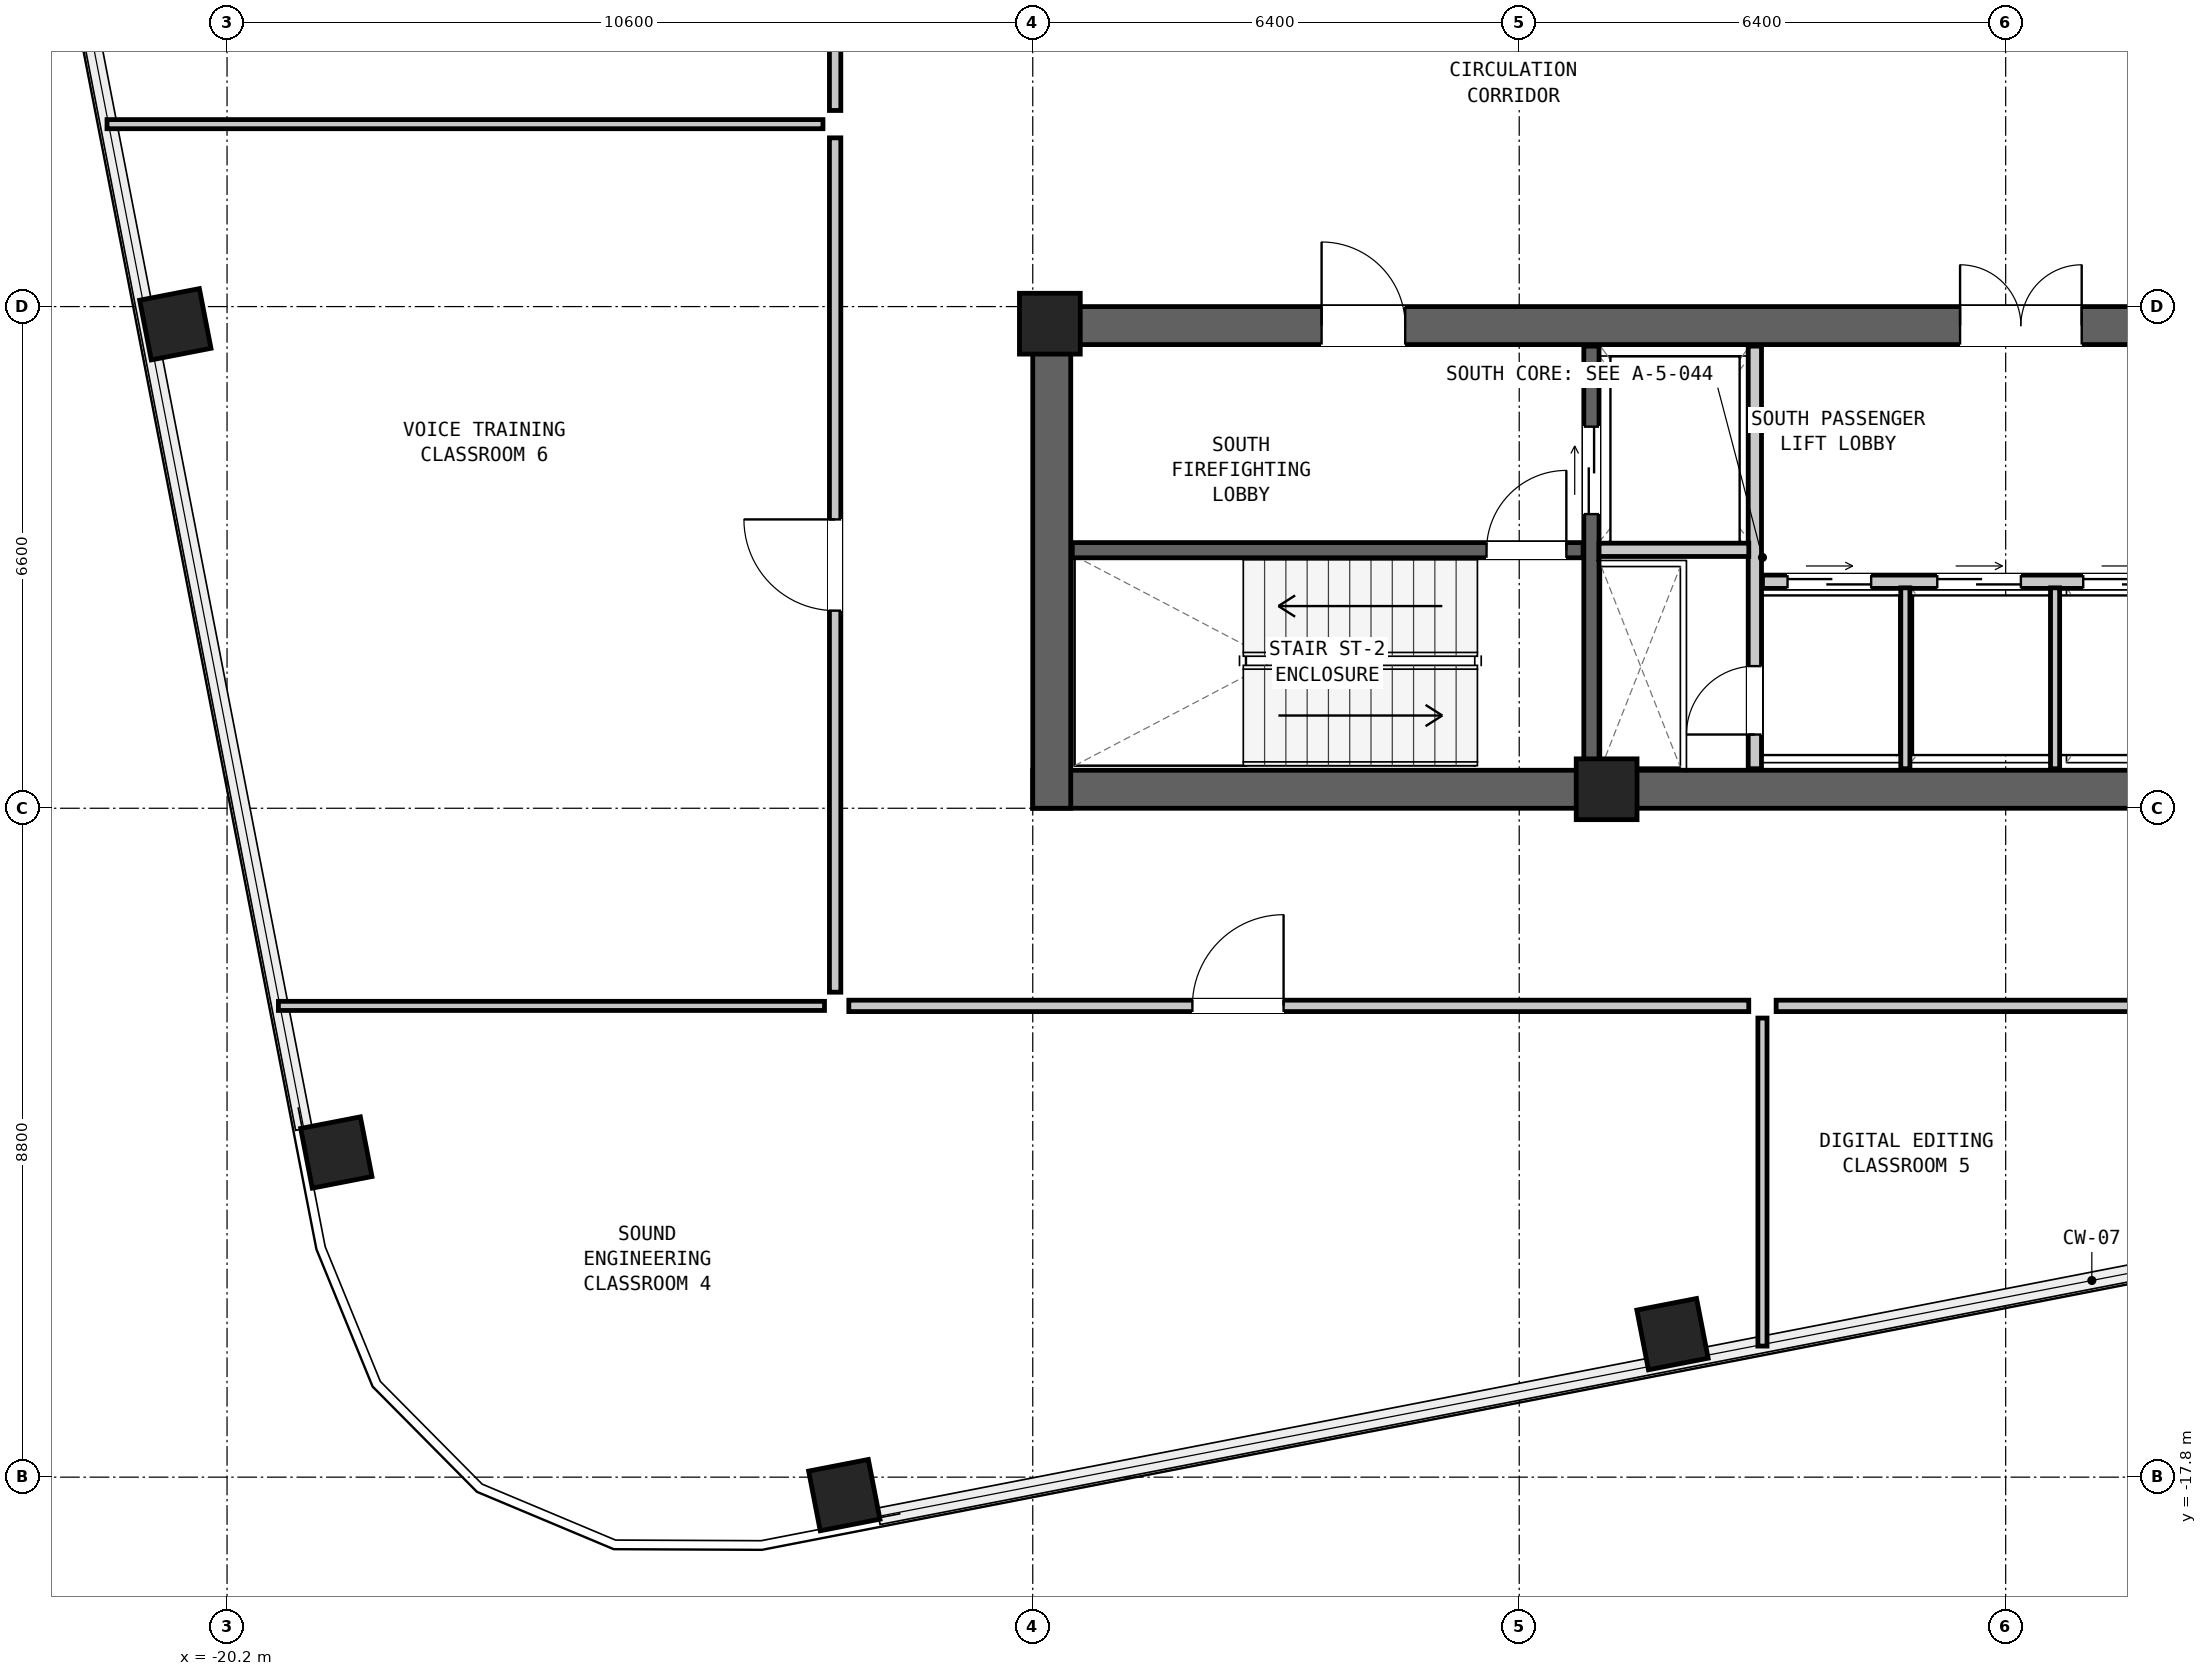
"""IFC4 building model, lengths in metres.
Left out: names, types, materials, properties, quantities, classifications, styles, units other than length and angle.
Written with IfcOpenShell. Run it as: python <this file> out.ifc"""

import sys

from ifc_helpers import new_model, si_unit, direction, frame, frame_2d, origin, origin_2d, place, context, subcontext, project, spatial, rectangle, hollow_rectangle, extrude, element, fill, save


model = new_model("IFC4")
c1 = context("Model", 3, precision=1e-05, world=origin(), true_north=direction((0.0, 1.0)))
c2 = subcontext(c1, "Body", "Model", "MODEL_VIEW")
j1 = project(units=[si_unit("LENGTHUNIT", "METRE"), si_unit("PLANEANGLEUNIT", "RADIAN")], contexts=[c1])
p1 = place(None, origin())
s1 = spatial("IfcSite", under=j1, at=p1, CompositionType="ELEMENT")
p2 = place(p1, origin())
s2 = spatial("IfcBuilding", under=s1, at=p2, CompositionType="ELEMENT")
p3 = place(p2, frame((0.0, 0.0, 140.25)))
s3 = spatial("IfcBuildingStorey", under=s2, at=p3, CompositionType="ELEMENT", Elevation=140.25)
p4 = place(p3, frame((-9.6, -8.75, 0.0), z_axis=(0.0, 0.0, 1.0), x_axis=(1.0, 0.0, 0.0)))
e1 = element("IfcWall", 1, at=p4, inside=s3, PredefinedType="SHEAR", context=c2, shape_type="SweptSolid", body=[
    extrude(rectangle(XDim=19.2, YDim=0.5, at=frame_2d((9.6, 0.0))), origin(), (0.0, 0.0, 1.0), 4.35),
])
p5 = place(p3, frame((-9.6, -2.65, 0.0), z_axis=(0.0, 0.0, 1.0), x_axis=(1.0, 0.0, 0.0)))
e2 = element("IfcWall", 2, at=p5, inside=s3, PredefinedType="SHEAR", context=c2, shape_type="SweptSolid", body=[
    extrude(rectangle(XDim=19.2, YDim=0.5, at=frame_2d((9.6, 0.0))), origin(), (0.0, 0.0, 1.0), 4.35),
])
p6 = place(p5, frame((3.8, 0.0, 0.0)))
e3 = element("IfcOpeningElement", 3, at=p6, cuts=e2, PredefinedType="OPENING", context=c2, shape_type="SweptSolid", body=[
    extrude(rectangle(XDim=1.1, YDim=2.08, at=frame_2d((0.55, 1.04))), frame((0.0, 0.262, 0.0), z_axis=(0.0, -1.0, 0.0), x_axis=(1.0, 0.0, 0.0)), (0.0, 0.0, 1.0), 0.524),
])
p7 = place(p5, frame((12.2, 0.0, 0.0)))
e4 = element("IfcOpeningElement", 4, at=p7, cuts=e2, PredefinedType="OPENING", context=c2, shape_type="SweptSolid", body=[
    extrude(rectangle(XDim=1.6, YDim=2.12, at=frame_2d((0.8, 1.06))), frame((0.0, 0.262, 0.0), z_axis=(0.0, -1.0, 0.0), x_axis=(1.0, 0.0, 0.0)), (0.0, 0.0, 1.0), 0.524),
])
p8 = place(p5, frame((16.5, 0.0, 0.0)))
e5 = element("IfcOpeningElement", 5, at=p8, cuts=e2, PredefinedType="OPENING", context=c2, shape_type="SweptSolid", body=[
    extrude(rectangle(XDim=0.9, YDim=2.05, at=frame_2d((0.45, 1.025))), frame((0.0, 0.262, 0.0), z_axis=(0.0, -1.0, 0.0), x_axis=(1.0, 0.0, 0.0)), (0.0, 0.0, 1.0), 0.524),
])
p9 = place(p3, frame((-9.35, -9.0, 0.0), z_axis=(0.0, 0.0, 1.0), x_axis=(0.0, 1.0, 0.0)))
e6 = element("IfcWall", 6, at=p9, inside=s3, PredefinedType="SHEAR", context=c2, shape_type="SweptSolid", body=[
    extrude(rectangle(XDim=6.6, YDim=0.5, at=frame_2d((3.3, 0.0))), origin(), (0.0, 0.0, 1.0), 4.35),
])
for number, where, z_axis, x_axis in (
    (7, (-12.08, -18.036, 0.0), (0.0, 0.0, 1.0), (0.982, 0.191, 0.0)),
    (8, (-1.183, -15.918, 0.0), (0.0, 0.0, 1.0), (0.982, 0.191, 0.0)),
    (9, (-20.88, -2.633, 0.0), (0.0, 0.0, 1.0), (-0.191, 0.982, 0.0)),
    (10, (-18.762, -13.529, 0.0), (0.0, 0.0, 1.0), (-0.191, 0.982, 0.0)),
):
    element("IfcColumn", number, at=place(p3, frame(where, z_axis=z_axis, x_axis=x_axis)), inside=s3, PredefinedType="COLUMN", context=c2, shape_type="SweptSolid", body=[
        extrude(hollow_rectangle(XDim=0.8, YDim=0.8, WallThickness=0.05, at=origin_2d()), origin(), (0.0, 0.0, 1.0), 4.35),
    ])
for number, where, z_axis, x_axis in (
    (11, (-9.375, -2.625, 0.0), (0.0, 0.0, 1.0), (1.0, 0.0, 0.0)),
    (12, (-2.05, -8.75, 0.0), (0.0, 0.0, 1.0), (1.0, 0.0, 0.0)),
):
    element("IfcColumn", number, at=place(p3, frame(where, z_axis=z_axis, x_axis=x_axis)), inside=s3, PredefinedType="COLUMN", context=c2, shape_type="SweptSolid", body=[
        extrude(rectangle(XDim=0.8, YDim=0.8, at=origin_2d()), origin(), (0.0, 0.0, 1.0), 4.35),
    ])
p10 = place(p3, frame((-9.08, -5.605, 0.0), z_axis=(0.0, 0.0, 1.0), x_axis=(1.0, 0.0, 0.0)))
e13 = element("IfcWall", 13, at=p10, inside=s3, PredefinedType="SHEAR", context=c2, shape_type="SweptSolid", body=[
    extrude(rectangle(XDim=6.72, YDim=0.2, at=frame_2d((3.36, 0.0))), origin(), (0.0, 0.0, 1.0), 4.07),
])
p11 = place(p10, frame((5.45, 0.0, 0.0)))
e14 = element("IfcOpeningElement", 14, at=p11, cuts=e13, PredefinedType="OPENING", context=c2, shape_type="SweptSolid", body=[
    extrude(rectangle(XDim=1.05, YDim=2.08, at=frame_2d((0.525, 1.04))), frame((0.0, 0.112, 0.0), z_axis=(0.0, -1.0, 0.0), x_axis=(1.0, 0.0, 0.0)), (0.0, 0.0, 1.0), 0.224),
])
p12 = place(p3, frame((-2.25, -8.48, 0.0), z_axis=(0.0, 0.0, 1.0), x_axis=(0.0, 1.0, 0.0)))
e15 = element("IfcWall", 15, at=p12, inside=s3, PredefinedType="SHEAR", context=c2, shape_type="SweptSolid", body=[
    extrude(rectangle(XDim=5.56, YDim=0.2, at=frame_2d((2.78, 0.0))), origin(), (0.0, 0.0, 1.0), 4.07),
])
p13 = place(p12, frame((3.35, 0.0, 0.0)))
e16 = element("IfcOpeningElement", 16, at=p13, cuts=e15, PredefinedType="OPENING", context=c2, shape_type="SweptSolid", body=[
    extrude(rectangle(XDim=1.15, YDim=2.08, at=frame_2d((0.575, 1.04))), frame((0.0, 0.112, 0.0), z_axis=(0.0, -1.0, 0.0), x_axis=(1.0, 0.0, 0.0)), (0.0, 0.0, 1.0), 0.224),
])
p14 = place(p3, frame((-0.1, -8.48, 0.0), z_axis=(0.0, 0.0, 1.0), x_axis=(0.0, 1.0, 0.0)))
e17 = element("IfcWall", 17, at=p14, inside=s3, PredefinedType="PARTITIONING", context=c2, shape_type="SweptSolid", body=[
    extrude(rectangle(XDim=5.56, YDim=0.175, at=frame_2d((2.78, 0.0))), origin(), (0.0, 0.0, 1.0), 4.07),
])
p15 = place(p14, frame((0.45, 0.0, 0.0)))
e18 = element("IfcOpeningElement", 18, at=p15, cuts=e17, PredefinedType="OPENING", context=c2, shape_type="SweptSolid", body=[
    extrude(rectangle(XDim=0.9, YDim=2.05, at=frame_2d((0.45, 1.025))), frame((0.0, 0.1, 0.0), z_axis=(0.0, -1.0, 0.0), x_axis=(1.0, 0.0, 0.0)), (0.0, 0.0, 1.0), 0.199),
])
p16 = place(p3, frame((-2.15, -5.6, 0.0), z_axis=(0.0, 0.0, 1.0), x_axis=(1.0, 0.0, 0.0)))
e19 = element("IfcWall", 19, at=p16, inside=s3, PredefinedType="PARTITIONING", context=c2, shape_type="SweptSolid", body=[
    extrude(rectangle(XDim=1.97, YDim=0.175, at=frame_2d((0.985, 0.0))), origin(), (0.0, 0.0, 1.0), 4.07),
])
p17 = place(p3, frame((0.0, -6.02, 0.0), z_axis=(0.0, 0.0, 1.0), x_axis=(1.0, 0.0, 0.0)))
e20 = element("IfcWall", 20, at=p17, inside=s3, PredefinedType="PARTITIONING", context=c2, shape_type="SweptSolid", body=[
    extrude(rectangle(XDim=9.08, YDim=0.175, at=frame_2d((4.54, 0.0))), origin(), (0.0, 0.0, 1.0), 4.07),
])
p18 = place(p17, frame((0.33, 0.0, 0.0)))
e21 = element("IfcOpeningElement", 21, at=p18, cuts=e20, PredefinedType="OPENING", context=c2, shape_type="SweptSolid", body=[
    extrude(rectangle(XDim=1.1, YDim=2.06, at=frame_2d((0.55, 1.03))), frame((0.0, 0.1, 0.0), z_axis=(0.0, -1.0, 0.0), x_axis=(1.0, 0.0, 0.0)), (0.0, 0.0, 1.0), 0.199),
])
p19 = place(p17, frame((2.3, 0.0, 0.0)))
e22 = element("IfcOpeningElement", 22, at=p19, cuts=e20, PredefinedType="OPENING", context=c2, shape_type="SweptSolid", body=[
    extrude(rectangle(XDim=1.1, YDim=2.06, at=frame_2d((0.55, 1.03))), frame((0.0, 0.1, 0.0), z_axis=(0.0, -1.0, 0.0), x_axis=(1.0, 0.0, 0.0)), (0.0, 0.0, 1.0), 0.199),
])
p20 = place(p17, frame((4.22, 0.0, 0.0)))
e23 = element("IfcOpeningElement", 23, at=p20, cuts=e20, PredefinedType="OPENING", context=c2, shape_type="SweptSolid", body=[
    extrude(rectangle(XDim=1.1, YDim=2.06, at=frame_2d((0.55, 1.03))), frame((0.0, 0.1, 0.0), z_axis=(0.0, -1.0, 0.0), x_axis=(1.0, 0.0, 0.0)), (0.0, 0.0, 1.0), 0.199),
])
p21 = place(p17, frame((5.94, 0.0, 0.0)))
e24 = element("IfcOpeningElement", 24, at=p21, cuts=e20, PredefinedType="OPENING", context=c2, shape_type="SweptSolid", body=[
    extrude(rectangle(XDim=1.1, YDim=2.06, at=frame_2d((0.55, 1.03))), frame((0.0, 0.1, 0.0), z_axis=(0.0, -1.0, 0.0), x_axis=(1.0, 0.0, 0.0)), (0.0, 0.0, 1.0), 0.199),
])
p22 = place(p17, frame((7.66, 0.0, 0.0)))
e25 = element("IfcOpeningElement", 25, at=p22, cuts=e20, PredefinedType="OPENING", context=c2, shape_type="SweptSolid", body=[
    extrude(rectangle(XDim=1.1, YDim=2.06, at=frame_2d((0.55, 1.03))), frame((0.0, 0.1, 0.0), z_axis=(0.0, -1.0, 0.0), x_axis=(1.0, 0.0, 0.0)), (0.0, 0.0, 1.0), 0.199),
])
for number, where, z_axis, x_axis in (
    (26, (1.88, -8.48, 0.0), (0.0, 0.0, 1.0), (0.0, 1.0, 0.0)),
    (27, (3.85, -8.48, 0.0), (0.0, 0.0, 1.0), (0.0, 1.0, 0.0)),
):
    element("IfcWall", number, at=place(p3, frame(where, z_axis=z_axis, x_axis=x_axis)), inside=s3, PredefinedType="PARTITIONING", context=c2, shape_type="SweptSolid", body=[
        extrude(rectangle(XDim=2.38, YDim=0.12, at=frame_2d((1.19, 0.0))), origin(), (0.0, 0.0, 1.0), 4.07),
    ])
p23 = place(p3, frame((-19.524, -11.6, 0.0), z_axis=(0.0, 0.0, 1.0), x_axis=(1.0, 0.0, 0.0)))
e28 = element("IfcWall", 28, at=p23, inside=s3, PredefinedType="PARTITIONING", context=c2, shape_type="SweptSolid", body=[
    extrude(rectangle(XDim=7.184, YDim=0.12, at=frame_2d((3.592, 0.0))), origin(), (0.0, 0.0, 1.0), 2.25),
])
p24 = place(p3, frame((0.0, -16.075, 0.0), z_axis=(0.0, 0.0, 1.0), x_axis=(0.0, 1.0, 0.0)))
e29 = element("IfcWall", 29, at=p24, inside=s3, PredefinedType="PARTITIONING", context=c2, shape_type="SweptSolid", body=[
    extrude(rectangle(XDim=4.315, YDim=0.12, at=frame_2d((2.158, 0.0))), origin(), (0.0, 0.0, 1.0), 2.25),
])
p25 = place(p3, frame((-21.779, 0.0, 0.0), z_axis=(0.0, 0.0, 1.0), x_axis=(1.0, 0.0, 0.0)))
e30 = element("IfcWall", 30, at=p25, inside=s3, PredefinedType="PARTITIONING", context=c2, shape_type="SweptSolid", body=[
    extrude(rectangle(XDim=9.419, YDim=0.12, at=frame_2d((4.709, 0.0))), origin(), (0.0, 0.0, 1.0), 4.07),
])
p26 = place(p3, frame((-12.02, -11.6, 0.0), z_axis=(0.0, 0.0, 1.0), x_axis=(1.0, 0.0, 0.0)))
e31 = element("IfcWall", 31, at=p26, inside=s3, PredefinedType="PARTITIONING", context=c2, shape_type="SweptSolid", body=[
    extrude(rectangle(XDim=11.84, YDim=0.15, at=frame_2d((5.92, 0.0))), origin(), (0.0, 0.0, 1.0), 2.25),
])
p27 = place(p26, frame((4.52, 0.0, 0.0)))
e32 = element("IfcOpeningElement", 32, at=p27, cuts=e31, PredefinedType="OPENING", context=c2, shape_type="SweptSolid", body=[
    extrude(rectangle(XDim=1.2, YDim=2.1, at=frame_2d((0.6, 1.05))), frame((0.0, 0.087, 0.0), z_axis=(0.0, -1.0, 0.0), x_axis=(1.0, 0.0, 0.0)), (0.0, 0.0, 1.0), 0.174),
])
p28 = place(p3, frame((0.18, -11.6, 0.0), z_axis=(0.0, 0.0, 1.0), x_axis=(1.0, 0.0, 0.0)))
e33 = element("IfcWall", 33, at=p28, inside=s3, PredefinedType="PARTITIONING", context=c2, shape_type="SweptSolid", body=[
    extrude(rectangle(XDim=11.84, YDim=0.15, at=frame_2d((5.92, 0.0))), origin(), (0.0, 0.0, 1.0), 2.25),
])
p29 = place(p28, frame((5.32, 0.0, 0.0)))
e34 = element("IfcOpeningElement", 34, at=p29, cuts=e33, PredefinedType="OPENING", context=c2, shape_type="SweptSolid", body=[
    extrude(rectangle(XDim=1.2, YDim=2.1, at=frame_2d((0.6, 1.05))), frame((0.0, 0.087, 0.0), z_axis=(0.0, -1.0, 0.0), x_axis=(1.0, 0.0, 0.0)), (0.0, 0.0, 1.0), 0.174),
])
p30 = place(p3, frame((-12.2, -11.42, 0.0), z_axis=(0.0, 0.0, 1.0), x_axis=(0.0, 1.0, 0.0)))
e35 = element("IfcWall", 35, at=p30, inside=s3, PredefinedType="PARTITIONING", context=c2, shape_type="SweptSolid", body=[
    extrude(rectangle(XDim=11.24, YDim=0.15, at=frame_2d((5.62, 0.0))), origin(), (0.0, 0.0, 1.0), 4.07),
])
p31 = place(p30, frame((5.02, 0.0, 0.0)))
e36 = element("IfcOpeningElement", 36, at=p31, cuts=e35, PredefinedType="OPENING", context=c2, shape_type="SweptSolid", body=[
    extrude(rectangle(XDim=1.2, YDim=2.1, at=frame_2d((0.6, 1.05))), frame((0.0, 0.087, 0.0), z_axis=(0.0, -1.0, 0.0), x_axis=(1.0, 0.0, 0.0)), (0.0, 0.0, 1.0), 0.174),
])
p32 = place(p3, frame((-12.2, 0.18, 0.0), z_axis=(0.0, 0.0, 1.0), x_axis=(0.0, 1.0, 0.0)))
e37 = element("IfcWall", 37, at=p32, inside=s3, PredefinedType="PARTITIONING", context=c2, shape_type="SweptSolid", body=[
    extrude(rectangle(XDim=12.44, YDim=0.15, at=frame_2d((6.22, 0.0))), origin(), (0.0, 0.0, 1.0), 4.07),
])
p33 = place(p32, frame((5.62, 0.0, 0.0)))
e38 = element("IfcOpeningElement", 38, at=p33, cuts=e37, PredefinedType="OPENING", context=c2, shape_type="SweptSolid", body=[
    extrude(rectangle(XDim=1.2, YDim=2.1, at=frame_2d((0.6, 1.05))), frame((0.0, 0.087, 0.0), z_axis=(0.0, -1.0, 0.0), x_axis=(1.0, 0.0, 0.0)), (0.0, 0.0, 1.0), 0.174),
])
p34 = place(p11, origin())
e39 = element("IfcDoor", 39, at=p34, inside=s3, OperationType="SINGLE_SWING_RIGHT", PredefinedType="DOOR", context=c2, shape_type="SweptSolid", body=[
    extrude(rectangle(XDim=1.05, YDim=2.08, at=frame_2d((0.525, 1.04))), frame((0.0, 0.025, 0.0), z_axis=(0.0, -1.0, 0.0), x_axis=(1.0, 0.0, 0.0)), (0.0, 0.0, 1.0), 0.05),
])
fill(e14, e39)
p35 = place(p6, origin())
e40 = element("IfcDoor", 40, at=p35, inside=s3, OperationType="SINGLE_SWING_LEFT", PredefinedType="DOOR", context=c2, shape_type="SweptSolid", body=[
    extrude(rectangle(XDim=1.1, YDim=2.08, at=frame_2d((0.55, 1.04))), frame((0.0, 0.025, 0.0), z_axis=(0.0, -1.0, 0.0), x_axis=(1.0, 0.0, 0.0)), (0.0, 0.0, 1.0), 0.05),
])
fill(e3, e40)
p36 = place(p13, origin())
e41 = element("IfcDoor", 41, at=p36, inside=s3, OperationType="DOUBLE_DOOR_SLIDING", PredefinedType="DOOR", context=c2, shape_type="SweptSolid", body=[
    extrude(rectangle(XDim=1.15, YDim=2.08, at=frame_2d((0.575, 1.04))), frame((0.0, 0.025, 0.0), z_axis=(0.0, -1.0, 0.0), x_axis=(1.0, 0.0, 0.0)), (0.0, 0.0, 1.0), 0.05),
])
fill(e16, e41)
p37 = place(p15, origin())
e42 = element("IfcDoor", 42, at=p37, inside=s3, OperationType="SINGLE_SWING_LEFT", PredefinedType="DOOR", context=c2, shape_type="SweptSolid", body=[
    extrude(rectangle(XDim=0.9, YDim=2.05, at=frame_2d((0.45, 1.025))), frame((0.0, 0.025, 0.0), z_axis=(0.0, -1.0, 0.0), x_axis=(1.0, 0.0, 0.0)), (0.0, 0.0, 1.0), 0.05),
])
fill(e18, e42)
p38 = place(p18, origin())
e43 = element("IfcDoor", 43, at=p38, inside=s3, OperationType="DOUBLE_DOOR_SLIDING", PredefinedType="DOOR", context=c2, shape_type="SweptSolid", body=[
    extrude(rectangle(XDim=1.1, YDim=2.06, at=frame_2d((0.55, 1.03))), frame((0.0, 0.025, 0.0), z_axis=(0.0, -1.0, 0.0), x_axis=(1.0, 0.0, 0.0)), (0.0, 0.0, 1.0), 0.05),
])
fill(e21, e43)
p39 = place(p19, origin())
e44 = element("IfcDoor", 44, at=p39, inside=s3, OperationType="DOUBLE_DOOR_SLIDING", PredefinedType="DOOR", context=c2, shape_type="SweptSolid", body=[
    extrude(rectangle(XDim=1.1, YDim=2.06, at=frame_2d((0.55, 1.03))), frame((0.0, 0.025, 0.0), z_axis=(0.0, -1.0, 0.0), x_axis=(1.0, 0.0, 0.0)), (0.0, 0.0, 1.0), 0.05),
])
fill(e22, e44)
p40 = place(p7, origin())
e45 = element("IfcDoor", 45, at=p40, inside=s3, OperationType="DOUBLE_DOOR_SINGLE_SWING", PredefinedType="DOOR", context=c2, shape_type="SweptSolid", body=[
    extrude(rectangle(XDim=1.6, YDim=2.12, at=frame_2d((0.8, 1.06))), frame((0.0, 0.025, 0.0), z_axis=(0.0, -1.0, 0.0), x_axis=(1.0, 0.0, 0.0)), (0.0, 0.0, 1.0), 0.05),
])
fill(e4, e45)
p41 = place(p27, origin())
e46 = element("IfcDoor", 46, at=p41, inside=s3, OperationType="SINGLE_SWING_RIGHT", PredefinedType="DOOR", context=c2, shape_type="SweptSolid", body=[
    extrude(rectangle(XDim=1.2, YDim=2.1, at=frame_2d((0.6, 1.05))), frame((0.0, 0.025, 0.0), z_axis=(0.0, -1.0, 0.0), x_axis=(1.0, 0.0, 0.0)), (0.0, 0.0, 1.0), 0.05),
])
fill(e32, e46)
p42 = place(p31, origin())
e47 = element("IfcDoor", 47, at=p42, inside=s3, OperationType="SINGLE_SWING_RIGHT", PredefinedType="DOOR", context=c2, shape_type="SweptSolid", body=[
    extrude(rectangle(XDim=1.2, YDim=2.1, at=frame_2d((0.6, 1.05))), frame((0.0, 0.025, 0.0), z_axis=(0.0, -1.0, 0.0), x_axis=(1.0, 0.0, 0.0)), (0.0, 0.0, 1.0), 0.05),
])
fill(e36, e47)
p43 = place(p20, origin())
e48 = element("IfcDoor", 48, at=p43, inside=s3, OperationType="DOUBLE_DOOR_SLIDING", PredefinedType="DOOR", context=c2, shape_type="SweptSolid", body=[
    extrude(rectangle(XDim=1.1, YDim=2.06, at=frame_2d((0.55, 1.03))), frame((0.0, 0.025, 0.0), z_axis=(0.0, -1.0, 0.0), x_axis=(1.0, 0.0, 0.0)), (0.0, 0.0, 1.0), 0.05),
])
fill(e23, e48)
save(model, sys.argv[1])
